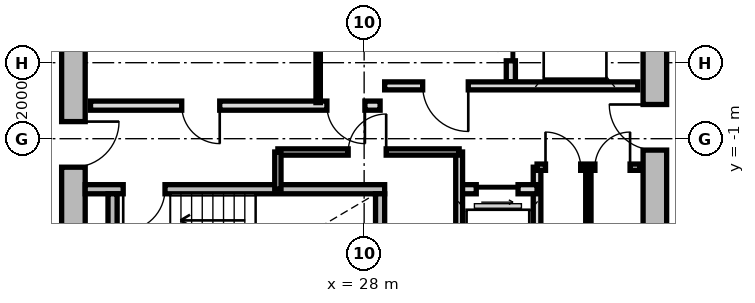
"""IFC4 building model, lengths in metres.
Left out: names, types, materials, properties, quantities, classifications, styles, units other than length and angle.
Written with IfcOpenShell. Run it as: python <this file> out.ifc"""

import sys

from ifc_helpers import new_model, si_unit, direction, frame, frame_2d, origin, place, context, subcontext, project, spatial, rectangle, extrude, source, transform, mapped, element, fill, save


model = new_model("IFC4")
c1 = context("Model", 3, precision=1e-05, world=origin(), true_north=direction((0.0, 1.0)))
c2 = subcontext(c1, "Body", "Model", "MODEL_VIEW")
j1 = project(units=[si_unit("LENGTHUNIT", "METRE"), si_unit("PLANEANGLEUNIT", "RADIAN")], contexts=[c1])
p1 = place(None, origin())
s1 = spatial("IfcSite", under=j1, at=p1, CompositionType="ELEMENT")
p2 = place(p1, origin())
s2 = spatial("IfcBuilding", under=s1, at=p2, CompositionType="ELEMENT")
p3 = place(p2, frame((0.0, 0.0, 180.05)))
s3 = spatial("IfcBuildingStorey", under=s2, at=p3, CompositionType="ELEMENT", Elevation=180.05)
m1 = source(origin(), c2, "Body", "SweptSolid", [
    extrude(rectangle(XDim=11.1, YDim=0.62, at=frame_2d((5.55, 0.0))), origin(), (0.0, 0.0, 1.0), 2.81),
])
p4 = place(p3, frame((20.35, -5.55, 0.0), z_axis=(0.0, 0.0, 1.0), x_axis=(0.0, 1.0, 0.0)))
e1 = element("IfcWall", 1, at=p4, inside=s3, PredefinedType="SHEAR", context=c2, shape_type="MappedRepresentation", body=[
    mapped(m1, transform((0.0, 0.0, 0.0), x_axis=(1.0, 0.0, 0.0), y_axis=(0.0, 1.0, 0.0), z_axis=(0.0, 0.0, 1.0), scale=1.0)),
])
p5 = place(p4, frame((3.8, 0.0, 0.0)))
e2 = element("IfcOpeningElement", 2, at=p5, cuts=e1, PredefinedType="OPENING", context=c2, shape_type="SweptSolid", body=[
    extrude(rectangle(XDim=1.2, YDim=2.15, at=frame_2d((0.6, 1.075))), frame((0.0, 0.32, 0.0), z_axis=(0.0, -1.0, 0.0), x_axis=(1.0, 0.0, 0.0)), (0.0, 0.0, 1.0), 0.64),
])
p6 = place(p3, frame((35.65, 5.55, 0.0), z_axis=(0.0, 0.0, 1.0), x_axis=(0.0, -1.0, 0.0)))
e3 = element("IfcWall", 3, at=p6, inside=s3, PredefinedType="SHEAR", context=c2, shape_type="MappedRepresentation", body=[
    mapped(m1, transform((0.0, 0.0, 0.0), x_axis=(1.0, 0.0, 0.0), y_axis=(0.0, 1.0, 0.0), z_axis=(0.0, 0.0, 1.0), scale=1.0)),
])
p7 = place(p6, frame((5.65, 0.0, 0.0)))
e4 = element("IfcOpeningElement", 4, at=p7, cuts=e3, PredefinedType="OPENING", context=c2, shape_type="SweptSolid", body=[
    extrude(rectangle(XDim=1.2, YDim=2.15, at=frame_2d((0.6, 1.075))), frame((0.0, 0.32, 0.0), z_axis=(0.0, -1.0, 0.0), x_axis=(1.0, 0.0, 0.0)), (0.0, 0.0, 1.0), 0.64),
])
m2 = source(origin(), c2, "Body", "SweptSolid", [
    extrude(rectangle(XDim=7.88, YDim=0.24, at=frame_2d((3.94, 0.0))), origin(), (0.0, 0.0, 1.0), 2.81),
])
p8 = place(p3, frame((20.66, -2.33, 0.0), z_axis=(0.0, 0.0, 1.0), x_axis=(1.0, 0.0, 0.0)))
e5 = element("IfcWall", 5, at=p8, inside=s3, PredefinedType="PARTITIONING", context=c2, shape_type="MappedRepresentation", body=[
    mapped(m2, transform((0.0, 0.0, 0.0), x_axis=(1.0, 0.0, 0.0), y_axis=(0.0, 1.0, 0.0), z_axis=(0.0, 0.0, 1.0), scale=1.0)),
])
p9 = place(p8, frame((1.0, 0.0, 0.0)))
e6 = element("IfcOpeningElement", 6, at=p9, cuts=e5, PredefinedType="OPENING", context=c2, shape_type="SweptSolid", body=[
    extrude(rectangle(XDim=1.1, YDim=2.15, at=frame_2d((0.55, 1.075))), frame((0.0, 0.13, 0.0), z_axis=(0.0, -1.0, 0.0), x_axis=(1.0, 0.0, 0.0)), (0.0, 0.0, 1.0), 0.26),
])
m3 = source(origin(), c2, "Body", "SweptSolid", [
    extrude(rectangle(XDim=3.19, YDim=0.24, at=frame_2d((1.595, 0.0))), origin(), (0.0, 0.0, 1.0), 2.81),
])
for number, where, z_axis, x_axis in (
    (7, (21.38, -5.64, 0.0), (0.0, 0.0, 1.0), (0.0, 1.0, 0.0)),
    (8, (28.42, -5.64, 0.0), (0.0, 0.0, 1.0), (0.0, 1.0, 0.0)),
):
    element("IfcWall", number, at=place(p3, frame(where, z_axis=z_axis, x_axis=x_axis)), inside=s3, PredefinedType="PARTITIONING", context=c2, shape_type="MappedRepresentation", body=[
        mapped(m3, transform((0.0, 0.0, 0.0), x_axis=(1.0, 0.0, 0.0), y_axis=(0.0, 1.0, 0.0), z_axis=(0.0, 0.0, 1.0), scale=1.0)),
    ])
m4 = source(origin(), c2, "Body", "SweptSolid", [
    extrude(rectangle(XDim=5.0, YDim=0.24, at=frame_2d((2.5, 0.0))), origin(), (0.0, 0.0, 1.0), 2.795),
])
p10 = place(p3, frame((31.86, 0.5, 0.0), z_axis=(0.0, 0.0, 1.0), x_axis=(0.0, 1.0, 0.0)))
e9 = element("IfcWall", 9, at=p10, inside=s3, PredefinedType="PARTITIONING", context=c2, shape_type="MappedRepresentation", body=[
    mapped(m4, transform((0.0, 0.0, 0.0), x_axis=(1.0, 0.0, 0.0), y_axis=(0.0, 1.0, 0.0), z_axis=(0.0, 0.0, 1.0), scale=1.0)),
])
p11 = place(p10, frame((3.05, 0.0, 0.0)))
e10 = element("IfcOpeningElement", 10, at=p11, cuts=e9, PredefinedType="OPENING", context=c2, shape_type="SweptSolid", body=[
    extrude(rectangle(XDim=1.3, YDim=2.2, at=frame_2d((0.65, 1.1))), frame((0.0, 0.13, 0.0), z_axis=(0.0, -1.0, 0.0), x_axis=(1.0, 0.0, 0.0)), (0.0, 0.0, 1.0), 0.26),
])
p12 = place(p10, frame((0.55, 0.0, 0.0)))
e11 = element("IfcOpeningElement", 11, at=p12, cuts=e9, PredefinedType="OPENING", context=c2, shape_type="SweptSolid", body=[
    extrude(rectangle(XDim=1.3, YDim=2.2, at=frame_2d((0.65, 1.1))), frame((0.0, 0.13, 0.0), z_axis=(0.0, -1.0, 0.0), x_axis=(1.0, 0.0, 0.0)), (0.0, 0.0, 1.0), 0.26),
])
m5 = source(origin(), c2, "Body", "SweptSolid", [
    extrude(rectangle(XDim=6.66, YDim=0.21, at=frame_2d((3.33, 0.0))), origin(), (0.0, 0.0, 1.0), 2.795),
])
p13 = place(p3, frame((28.54, 0.39, 0.0), z_axis=(0.0, 0.0, 1.0), x_axis=(1.0, 0.0, 0.0)))
e12 = element("IfcWall", 12, at=p13, inside=s3, PredefinedType="PARTITIONING", context=c2, shape_type="MappedRepresentation", body=[
    mapped(m5, transform((0.0, 0.0, 0.0), x_axis=(1.0, 0.0, 0.0), y_axis=(0.0, 1.0, 0.0), z_axis=(0.0, 0.0, 1.0), scale=1.0)),
])
p14 = place(p13, frame((1.0, 0.0, 0.0)))
e13 = element("IfcOpeningElement", 13, at=p14, cuts=e12, PredefinedType="OPENING", context=c2, shape_type="SweptSolid", body=[
    extrude(rectangle(XDim=1.2, YDim=2.15, at=frame_2d((0.6, 1.075))), frame((0.0, 0.115, 0.0), z_axis=(0.0, -1.0, 0.0), x_axis=(1.0, 0.0, 0.0)), (0.0, 0.0, 1.0), 0.23),
])
m6 = source(origin(), c2, "Body", "SweptSolid", [
    extrude(rectangle(XDim=7.62, YDim=0.24, at=frame_2d((3.81, 0.0))), origin(), (0.0, 0.0, 1.0), 2.795),
])
p15 = place(p3, frame((20.8, -0.13, 0.0), z_axis=(0.0, 0.0, 1.0), x_axis=(1.0, 0.0, 0.0)))
e14 = element("IfcWall", 14, at=p15, inside=s3, PredefinedType="PARTITIONING", context=c2, shape_type="MappedRepresentation", body=[
    mapped(m6, transform((0.0, 0.0, 0.0), x_axis=(1.0, 0.0, 0.0), y_axis=(0.0, 1.0, 0.0), z_axis=(0.0, 0.0, 1.0), scale=1.0)),
])
p16 = place(p15, frame((6.22, 0.0, 0.0)))
e15 = element("IfcOpeningElement", 15, at=p16, cuts=e14, PredefinedType="OPENING", context=c2, shape_type="SweptSolid", body=[
    extrude(rectangle(XDim=1.0, YDim=2.1, at=frame_2d((0.5, 1.05))), frame((0.0, 0.13, 0.0), z_axis=(0.0, -1.0, 0.0), x_axis=(1.0, 0.0, 0.0)), (0.0, 0.0, 1.0), 0.26),
])
p17 = place(p15, frame((2.4, 0.0, 0.0)))
e16 = element("IfcOpeningElement", 16, at=p17, cuts=e14, PredefinedType="OPENING", context=c2, shape_type="SweptSolid", body=[
    extrude(rectangle(XDim=1.0, YDim=2.1, at=frame_2d((0.5, 1.05))), frame((0.0, 0.13, 0.0), z_axis=(0.0, -1.0, 0.0), x_axis=(1.0, 0.0, 0.0)), (0.0, 0.0, 1.0), 0.26),
])
m7 = source(origin(), c2, "Body", "SweptSolid", [
    extrude(rectangle(XDim=2.33, YDim=0.115, at=frame_2d((1.165, 0.0))), origin(), (0.0, 0.0, 1.0), 2.795),
])
p18 = place(p3, frame((26.79, -0.05, 0.0), z_axis=(0.0, 0.0, 1.0), x_axis=(0.0, 1.0, 0.0)))
e17 = element("IfcWall", 17, at=p18, inside=s3, PredefinedType="PARTITIONING", context=c2, shape_type="MappedRepresentation", body=[
    mapped(m7, transform((0.0, 0.0, 0.0), x_axis=(1.0, 0.0, 0.0), y_axis=(0.0, 1.0, 0.0), z_axis=(0.0, 0.0, 1.0), scale=1.0)),
])
m8 = source(origin(), c2, "Body", "SweptSolid", [
    extrude(rectangle(XDim=3.8, YDim=0.2, at=frame_2d((1.9, 0.0))), origin(), (0.0, 0.0, 1.0), 2.795),
])
p19 = place(p3, frame((32.55, -5.55, 0.0), z_axis=(0.0, 0.0, 1.0), x_axis=(0.0, 1.0, 0.0)))
e18 = element("IfcWall", 18, at=p19, inside=s3, PredefinedType="PARTITIONING", context=c2, shape_type="MappedRepresentation", body=[
    mapped(m8, transform((0.0, 0.0, 0.0), x_axis=(1.0, 0.0, 0.0), y_axis=(0.0, 1.0, 0.0), z_axis=(0.0, 0.0, 1.0), scale=1.0)),
])
m9 = source(origin(), c2, "Body", "SweptSolid", [
    extrude(rectangle(XDim=2.05, YDim=0.24, at=frame_2d((1.025, 0.0))), origin(), (0.0, 0.0, 1.0), 2.795),
])
p20 = place(p3, frame((30.5, -2.33, 0.0), z_axis=(0.0, 0.0, 1.0), x_axis=(1.0, 0.0, 0.0)))
e19 = element("IfcWall", 19, at=p20, inside=s3, PredefinedType="PARTITIONING", context=c2, shape_type="MappedRepresentation", body=[
    mapped(m9, transform((0.0, 0.0, 0.0), x_axis=(1.0, 0.0, 0.0), y_axis=(0.0, 1.0, 0.0), z_axis=(0.0, 0.0, 1.0), scale=1.0)),
])
p21 = place(p20, frame((0.45, 0.0, 0.0)))
e20 = element("IfcOpeningElement", 20, at=p21, cuts=e19, PredefinedType="OPENING", context=c2, shape_type="SweptSolid", body=[
    extrude(rectangle(XDim=1.1, YDim=2.2, at=frame_2d((0.55, 1.1))), frame((0.0, 0.13, 0.0), z_axis=(0.0, -1.0, 0.0), x_axis=(1.0, 0.0, 0.0)), (0.0, 0.0, 1.0), 0.26),
])
m10 = source(origin(), c2, "Body", "SweptSolid", [
    extrude(rectangle(XDim=4.2, YDim=0.18, at=frame_2d((2.1, 0.0))), origin(), (0.0, 0.0, 1.0), 2.795),
])
p22 = place(p3, frame((30.5, -5.55, 0.0), z_axis=(0.0, 0.0, 1.0), x_axis=(0.0, 1.0, 0.0)))
e21 = element("IfcWall", 21, at=p22, inside=s3, PredefinedType="PARTITIONING", context=c2, shape_type="MappedRepresentation", body=[
    mapped(m10, transform((0.0, 0.0, 0.0), x_axis=(1.0, 0.0, 0.0), y_axis=(0.0, 1.0, 0.0), z_axis=(0.0, 0.0, 1.0), scale=1.0)),
])
m11 = source(origin(), c2, "Body", "SweptSolid", [
    extrude(rectangle(XDim=4.77, YDim=0.165, at=frame_2d((2.385, 0.0))), origin(), (0.0, 0.0, 1.0), 2.795),
])
p23 = place(p3, frame((25.73, -1.35, 0.0), z_axis=(0.0, 0.0, 1.0), x_axis=(1.0, 0.0, 0.0)))
e22 = element("IfcWall", 22, at=p23, inside=s3, PredefinedType="PARTITIONING", context=c2, shape_type="MappedRepresentation", body=[
    mapped(m11, transform((0.0, 0.0, 0.0), x_axis=(1.0, 0.0, 0.0), y_axis=(0.0, 1.0, 0.0), z_axis=(0.0, 0.0, 1.0), scale=1.0)),
])
p24 = place(p23, frame((1.85, 0.0, 0.0)))
e23 = element("IfcOpeningElement", 23, at=p24, cuts=e22, PredefinedType="OPENING", context=c2, shape_type="SweptSolid", body=[
    extrude(rectangle(XDim=1.0, YDim=2.1, at=frame_2d((0.5, 1.05))), frame((0.0, 0.093, 0.0), z_axis=(0.0, -1.0, 0.0), x_axis=(1.0, 0.0, 0.0)), (0.0, 0.0, 1.0), 0.185),
])
m12 = source(origin(), c2, "Body", "SweptSolid", [
    extrude(rectangle(XDim=0.98, YDim=0.165, at=frame_2d((0.49, 0.0))), origin(), (0.0, 0.0, 1.0), 2.795),
])
p25 = place(p3, frame((25.73, -2.33, 0.0), z_axis=(0.0, 0.0, 1.0), x_axis=(0.0, 1.0, 0.0)))
e24 = element("IfcWall", 24, at=p25, inside=s3, PredefinedType="PARTITIONING", context=c2, shape_type="MappedRepresentation", body=[
    mapped(m12, transform((0.0, 0.0, 0.0), x_axis=(1.0, 0.0, 0.0), y_axis=(0.0, 1.0, 0.0), z_axis=(0.0, 0.0, 1.0), scale=1.0)),
])
m13 = source(origin(), c2, "Body", "SweptSolid", [
    extrude(rectangle(XDim=2.7, YDim=0.165, at=frame_2d((1.35, 0.0))), origin(), (0.0, 0.0, 1.0), 2.795),
])
p26 = place(p3, frame((32.55, -1.75, 0.0), z_axis=(0.0, 0.0, 1.0), x_axis=(1.0, 0.0, 0.0)))
e25 = element("IfcWall", 25, at=p26, inside=s3, PredefinedType="PARTITIONING", context=c2, shape_type="MappedRepresentation", body=[
    mapped(m13, transform((0.0, 0.0, 0.0), x_axis=(1.0, 0.0, 0.0), y_axis=(0.0, 1.0, 0.0), z_axis=(0.0, 0.0, 1.0), scale=1.0)),
])
p27 = place(p26, frame((0.222, 0.0, 0.0)))
e26 = element("IfcOpeningElement", 26, at=p27, cuts=e25, PredefinedType="OPENING", context=c2, shape_type="SweptSolid", body=[
    extrude(rectangle(XDim=0.925, YDim=2.1, at=frame_2d((0.462, 1.05))), frame((0.0, 0.093, 0.0), z_axis=(0.0, -1.0, 0.0), x_axis=(1.0, 0.0, 0.0)), (0.0, 0.0, 1.0), 0.185),
])
p28 = place(p26, frame((1.522, 0.0, 0.0)))
e27 = element("IfcOpeningElement", 27, at=p28, cuts=e25, PredefinedType="OPENING", context=c2, shape_type="SweptSolid", body=[
    extrude(rectangle(XDim=0.925, YDim=2.1, at=frame_2d((0.462, 1.05))), frame((0.0, 0.093, 0.0), z_axis=(0.0, -1.0, 0.0), x_axis=(1.0, 0.0, 0.0)), (0.0, 0.0, 1.0), 0.185),
])
m14 = source(origin(), c2, "Body", "SweptSolid", [
    extrude(rectangle(XDim=3.8, YDim=0.14, at=frame_2d((1.9, 0.0))), origin(), (0.0, 0.0, 1.0), 2.795),
])
p29 = place(p3, frame((33.9, -5.55, 0.0), z_axis=(0.0, 0.0, 1.0), x_axis=(0.0, 1.0, 0.0)))
e28 = element("IfcWall", 28, at=p29, inside=s3, PredefinedType="PARTITIONING", context=c2, shape_type="MappedRepresentation", body=[
    mapped(m14, transform((0.0, 0.0, 0.0), x_axis=(1.0, 0.0, 0.0), y_axis=(0.0, 1.0, 0.0), z_axis=(0.0, 0.0, 1.0), scale=1.0)),
])
m15 = source(origin(), c2, "Body", "SweptSolid", [
    extrude(rectangle(XDim=1.1, YDim=2.15, at=frame_2d((0.55, 1.075))), frame((0.0, 0.025, 0.0), z_axis=(0.0, -1.0, 0.0), x_axis=(1.0, 0.0, 0.0)), (0.0, 0.0, 1.0), 0.05),
])
p30 = place(p9, frame((1.1, 0.0, 0.0), z_axis=(0.0, 0.0, 1.0), x_axis=(-1.0, 0.0, 0.0)))
e29 = element("IfcDoor", 29, at=p30, inside=s3, OperationType="SINGLE_SWING_RIGHT", PredefinedType="DOOR", context=c2, shape_type="MappedRepresentation", body=[
    mapped(m15, transform((0.0, 0.0, 0.0), x_axis=(1.0, 0.0, 0.0), y_axis=(0.0, 1.0, 0.0), z_axis=(0.0, 0.0, 1.0), scale=1.0)),
])
fill(e6, e29)
m16 = source(origin(), c2, "Body", "SweptSolid", [
    extrude(rectangle(XDim=1.3, YDim=2.2, at=frame_2d((0.65, 1.1))), frame((0.0, 0.025, 0.0), z_axis=(0.0, -1.0, 0.0), x_axis=(1.0, 0.0, 0.0)), (0.0, 0.0, 1.0), 0.05),
])
p31 = place(p12, origin())
e30 = element("IfcDoor", 30, at=p31, inside=s3, OperationType="SLIDING_TO_RIGHT", PredefinedType="DOOR", context=c2, shape_type="MappedRepresentation", body=[
    mapped(m16, transform((0.0, 0.0, 0.0), x_axis=(1.0, 0.0, 0.0), y_axis=(0.0, 1.0, 0.0), z_axis=(0.0, 0.0, 1.0), scale=1.0)),
])
fill(e11, e30)
m17 = source(origin(), c2, "Body", "SweptSolid", [
    extrude(rectangle(XDim=1.2, YDim=2.15, at=frame_2d((0.6, 1.075))), frame((0.0, 0.025, 0.0), z_axis=(0.0, -1.0, 0.0), x_axis=(1.0, 0.0, 0.0)), (0.0, 0.0, 1.0), 0.05),
])
p32 = place(p14, frame((1.2, 0.0, 0.0), z_axis=(0.0, 0.0, 1.0), x_axis=(-1.0, 0.0, 0.0)))
e31 = element("IfcDoor", 31, at=p32, inside=s3, OperationType="SINGLE_SWING_LEFT", PredefinedType="DOOR", context=c2, shape_type="MappedRepresentation", body=[
    mapped(m17, transform((0.0, 0.0, 0.0), x_axis=(1.0, 0.0, 0.0), y_axis=(0.0, 1.0, 0.0), z_axis=(0.0, 0.0, 1.0), scale=1.0)),
])
fill(e13, e31)
p33 = place(p5, frame((1.2, 0.0, 0.0), z_axis=(0.0, 0.0, 1.0), x_axis=(-1.0, 0.0, 0.0)))
e32 = element("IfcDoor", 32, at=p33, inside=s3, OperationType="SINGLE_SWING_LEFT", PredefinedType="DOOR", context=c2, shape_type="MappedRepresentation", body=[
    mapped(m17, transform((0.0, 0.0, 0.0), x_axis=(1.0, 0.0, 0.0), y_axis=(0.0, 1.0, 0.0), z_axis=(0.0, 0.0, 1.0), scale=1.0)),
])
fill(e2, e32)
p34 = place(p7, frame((1.2, 0.0, 0.0), z_axis=(0.0, 0.0, 1.0), x_axis=(-1.0, 0.0, 0.0)))
e33 = element("IfcDoor", 33, at=p34, inside=s3, OperationType="SINGLE_SWING_RIGHT", PredefinedType="DOOR", context=c2, shape_type="MappedRepresentation", body=[
    mapped(m17, transform((0.0, 0.0, 0.0), x_axis=(1.0, 0.0, 0.0), y_axis=(0.0, 1.0, 0.0), z_axis=(0.0, 0.0, 1.0), scale=1.0)),
])
fill(e4, e33)
m18 = source(origin(), c2, "Body", "SweptSolid", [
    extrude(rectangle(XDim=1.0, YDim=2.1, at=frame_2d((0.5, 1.05))), frame((0.0, 0.025, 0.0), z_axis=(0.0, -1.0, 0.0), x_axis=(1.0, 0.0, 0.0)), (0.0, 0.0, 1.0), 0.05),
])
p35 = place(p16, frame((1.0, 0.0, 0.0), z_axis=(0.0, 0.0, 1.0), x_axis=(-1.0, 0.0, 0.0)))
e34 = element("IfcDoor", 34, at=p35, inside=s3, OperationType="SINGLE_SWING_LEFT", PredefinedType="DOOR", context=c2, shape_type="MappedRepresentation", body=[
    mapped(m18, transform((0.0, 0.0, 0.0), x_axis=(1.0, 0.0, 0.0), y_axis=(0.0, 1.0, 0.0), z_axis=(0.0, 0.0, 1.0), scale=1.0)),
])
fill(e15, e34)
p36 = place(p17, frame((1.0, 0.0, 0.0), z_axis=(0.0, 0.0, 1.0), x_axis=(-1.0, 0.0, 0.0)))
e35 = element("IfcDoor", 35, at=p36, inside=s3, OperationType="SINGLE_SWING_LEFT", PredefinedType="DOOR", context=c2, shape_type="MappedRepresentation", body=[
    mapped(m18, transform((0.0, 0.0, 0.0), x_axis=(1.0, 0.0, 0.0), y_axis=(0.0, 1.0, 0.0), z_axis=(0.0, 0.0, 1.0), scale=1.0)),
])
fill(e16, e35)
m19 = source(origin(), c2, "Body", "SweptSolid", [
    extrude(rectangle(XDim=1.1, YDim=2.2, at=frame_2d((0.55, 1.1))), frame((0.0, 0.025, 0.0), z_axis=(0.0, -1.0, 0.0), x_axis=(1.0, 0.0, 0.0)), (0.0, 0.0, 1.0), 0.05),
])
p37 = place(p21, frame((1.1, 0.0, 0.0), z_axis=(0.0, 0.0, 1.0), x_axis=(-1.0, 0.0, 0.0)))
e36 = element("IfcDoor", 36, at=p37, inside=s3, OperationType="SLIDING_TO_RIGHT", PredefinedType="DOOR", context=c2, shape_type="MappedRepresentation", body=[
    mapped(m19, transform((0.0, 0.0, 0.0), x_axis=(1.0, 0.0, 0.0), y_axis=(0.0, 1.0, 0.0), z_axis=(0.0, 0.0, 1.0), scale=1.0)),
])
fill(e20, e36)
p38 = place(p24, origin())
e37 = element("IfcDoor", 37, at=p38, inside=s3, OperationType="SINGLE_SWING_RIGHT", PredefinedType="DOOR", context=c2, shape_type="MappedRepresentation", body=[
    mapped(m18, transform((0.0, 0.0, 0.0), x_axis=(1.0, 0.0, 0.0), y_axis=(0.0, 1.0, 0.0), z_axis=(0.0, 0.0, 1.0), scale=1.0)),
])
fill(e23, e37)
m20 = source(origin(), c2, "Body", "SweptSolid", [
    extrude(rectangle(XDim=0.925, YDim=2.1, at=frame_2d((0.462, 1.05))), frame((0.0, 0.025, 0.0), z_axis=(0.0, -1.0, 0.0), x_axis=(1.0, 0.0, 0.0)), (0.0, 0.0, 1.0), 0.05),
])
p39 = place(p27, origin())
e38 = element("IfcDoor", 38, at=p39, inside=s3, OperationType="SINGLE_SWING_LEFT", PredefinedType="DOOR", context=c2, shape_type="MappedRepresentation", body=[
    mapped(m20, transform((0.0, 0.0, 0.0), x_axis=(1.0, 0.0, 0.0), y_axis=(0.0, 1.0, 0.0), z_axis=(0.0, 0.0, 1.0), scale=1.0)),
])
fill(e26, e38)
p40 = place(p28, origin())
e39 = element("IfcDoor", 39, at=p40, inside=s3, OperationType="SINGLE_SWING_RIGHT", PredefinedType="DOOR", context=c2, shape_type="MappedRepresentation", body=[
    mapped(m20, transform((0.0, 0.0, 0.0), x_axis=(1.0, 0.0, 0.0), y_axis=(0.0, 1.0, 0.0), z_axis=(0.0, 0.0, 1.0), scale=1.0)),
])
fill(e27, e39)
save(model, sys.argv[1])
